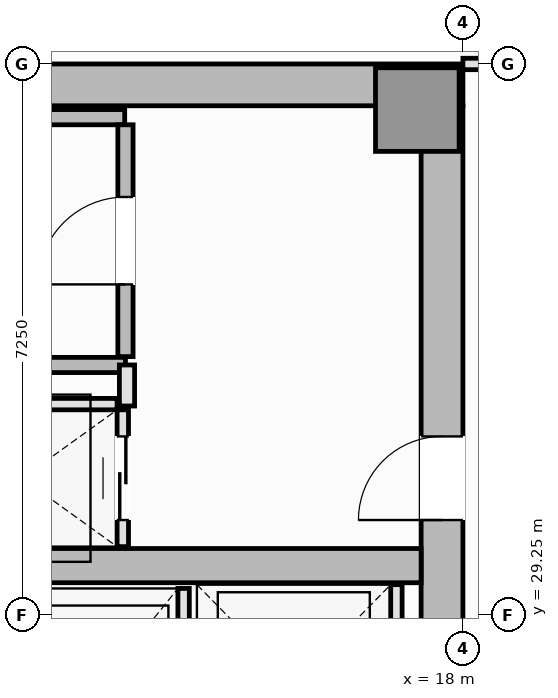
"""IFC4 building model, lengths in metres.
Left out: names, types, materials, properties, quantities, classifications, styles, units other than length and angle.
Written with IfcOpenShell. Run it as: python <this file> out.ifc"""

import sys

from ifc_helpers import new_model, si_unit, direction, frame, frame_2d, origin, origin_2d, place, context, subcontext, project, spatial, rectangle, extrude, element, fill, save


model = new_model("IFC4")
c1 = context("Model", 3, precision=1e-05, world=origin(), true_north=direction((0.0, 1.0)))
c2 = subcontext(c1, "Body", "Model", "MODEL_VIEW")
j1 = project(units=[si_unit("LENGTHUNIT", "METRE"), si_unit("PLANEANGLEUNIT", "RADIAN")], contexts=[c1])
p1 = place(None, origin())
s1 = spatial("IfcSite", under=j1, at=p1, CompositionType="ELEMENT")
p2 = place(p1, origin())
s2 = spatial("IfcBuilding", under=s1, at=p2, CompositionType="ELEMENT")
p3 = place(p2, frame((0.0, 0.0, 183.65)))
s3 = spatial("IfcBuildingStorey", under=s2, at=p3, CompositionType="ELEMENT", Elevation=183.65)
p4 = place(p3, frame((4.5, 36.225, 0.0), z_axis=(0.0, 0.0, 1.0), x_axis=(1.0, 0.0, 0.0)))
e1 = element("IfcWall", 1, at=p4, inside=s3, PredefinedType="SHEAR", context=c2, shape_type="SweptSolid", body=[
    extrude(rectangle(XDim=13.5, YDim=0.55, at=frame_2d((6.75, 0.0))), origin(), (0.0, 0.0, 1.0), 4.4),
])
p5 = place(p3, frame((17.725, 27.05, 0.0), z_axis=(0.0, 0.0, 1.0), x_axis=(0.0, 1.0, 0.0)))
e2 = element("IfcWall", 2, at=p5, inside=s3, PredefinedType="SHEAR", context=c2, shape_type="SweptSolid", body=[
    extrude(rectangle(XDim=8.9, YDim=0.55, at=frame_2d((4.45, 0.0))), origin(), (0.0, 0.0, 1.0), 4.4),
])
p6 = place(p5, frame((3.45, 0.0, 0.0)))
e3 = element("IfcOpeningElement", 3, at=p6, cuts=e2, PredefinedType="OPENING", context=c2, shape_type="SweptSolid", body=[
    extrude(rectangle(XDim=1.1, YDim=2.15, at=frame_2d((0.55, 1.075))), frame((0.0, 0.285, 0.0), z_axis=(0.0, -1.0, 0.0), x_axis=(1.0, 0.0, 0.0)), (0.0, 0.0, 1.0), 0.57),
])
p7 = place(p3, frame((5.05, 29.9, 0.0), z_axis=(0.0, 0.0, 1.0), x_axis=(1.0, 0.0, 0.0)))
e4 = element("IfcWall", 4, at=p7, inside=s3, PredefinedType="SHEAR", context=c2, shape_type="SweptSolid", body=[
    extrude(rectangle(XDim=12.4, YDim=0.45, at=frame_2d((6.2, 0.0))), origin(), (0.0, 0.0, 1.0), 4.4),
])
p8 = place(p3, frame((17.4, 35.9, 0.0), z_axis=(0.0, 0.0, 1.0), x_axis=(1.0, 0.0, 0.0)))
e5 = element("IfcColumn", 5, at=p8, inside=s3, PredefinedType="PILASTER", context=c2, shape_type="SweptSolid", body=[
    extrude(rectangle(XDim=1.1, YDim=1.1, at=origin_2d()), origin(), (0.0, 0.0, 1.0), 4.4),
])
p9 = place(p3, frame((5.8, 35.8, 0.0), z_axis=(0.0, 0.0, 1.0), x_axis=(1.0, 0.0, 0.0)))
e6 = element("IfcWall", 6, at=p9, inside=s3, PredefinedType="SOLIDWALL", context=c2, shape_type="SweptSolid", body=[
    extrude(rectangle(XDim=7.75, YDim=0.2, at=frame_2d((3.875, 0.0))), origin(), (0.0, 0.0, 1.0), 4.4),
])
p10 = place(p3, frame((5.9, 32.54, 0.0), z_axis=(0.0, 0.0, 1.0), x_axis=(1.0, 0.0, 0.0)))
e7 = element("IfcWall", 7, at=p10, inside=s3, PredefinedType="SOLIDWALL", context=c2, shape_type="SweptSolid", body=[
    extrude(rectangle(XDim=7.66, YDim=0.2, at=frame_2d((3.83, 0.0))), origin(), (0.0, 0.0, 1.0), 4.4),
])
p11 = place(p3, frame((13.56, 32.65, 0.0), z_axis=(0.0, 0.0, 1.0), x_axis=(0.0, 1.0, 0.0)))
e8 = element("IfcWall", 8, at=p11, inside=s3, PredefinedType="SOLIDWALL", context=c2, shape_type="SweptSolid", body=[
    extrude(rectangle(XDim=3.05, YDim=0.2, at=frame_2d((1.525, 0.0))), origin(), (0.0, 0.0, 1.0), 4.4),
])
p12 = place(p11, frame((0.95, 0.0, 0.0)))
e9 = element("IfcOpeningElement", 9, at=p12, cuts=e8, PredefinedType="OPENING", context=c2, shape_type="SweptSolid", body=[
    extrude(rectangle(XDim=1.15, YDim=2.15, at=frame_2d((0.575, 1.075))), frame((0.0, 0.11, 0.0), z_axis=(0.0, -1.0, 0.0), x_axis=(1.0, 0.0, 0.0)), (0.0, 0.0, 1.0), 0.22),
])
p13 = place(p3, frame((14.325, 27.05, 0.0), z_axis=(0.0, 0.0, 1.0), x_axis=(0.0, 1.0, 0.0)))
e10 = element("IfcWall", 10, at=p13, inside=s3, PredefinedType="PARTITIONING", context=c2, shape_type="SweptSolid", body=[
    extrude(rectangle(XDim=2.55, YDim=0.15, at=frame_2d((1.275, 0.0))), origin(), (0.0, 0.0, 1.0), 4.22),
])
p14 = place(p3, frame((17.125, 27.05, 0.0), z_axis=(0.0, 0.0, 1.0), x_axis=(0.0, 1.0, 0.0)))
e11 = element("IfcWall", 11, at=p14, inside=s3, PredefinedType="PARTITIONING", context=c2, shape_type="SweptSolid", body=[
    extrude(rectangle(XDim=2.6, YDim=0.15, at=frame_2d((1.3, 0.0))), origin(), (0.0, 0.0, 1.0), 4.22),
])
p15 = place(p3, frame((10.95, 32.025, 0.0), z_axis=(0.0, 0.0, 1.0), x_axis=(1.0, 0.0, 0.0)))
e12 = element("IfcWall", 12, at=p15, inside=s3, PredefinedType="PARTITIONING", context=c2, shape_type="SweptSolid", body=[
    extrude(rectangle(XDim=2.5, YDim=0.15, at=frame_2d((1.25, 0.0))), origin(), (0.0, 0.0, 1.0), 4.22),
])
p16 = place(p3, frame((13.525, 30.15, 0.0), z_axis=(0.0, 0.0, 1.0), x_axis=(0.0, 1.0, 0.0)))
e13 = element("IfcWall", 13, at=p16, inside=s3, PredefinedType="PARTITIONING", context=c2, shape_type="SweptSolid", body=[
    extrude(rectangle(XDim=1.8, YDim=0.15, at=frame_2d((0.9, 0.0))), origin(), (0.0, 0.0, 1.0), 4.22),
])
p17 = place(p16, frame((0.35, 0.0, 0.0)))
e14 = element("IfcOpeningElement", 14, at=p17, cuts=e13, PredefinedType="OPENING", context=c2, shape_type="SweptSolid", body=[
    extrude(rectangle(XDim=1.1, YDim=2.2, at=frame_2d((0.55, 1.1))), frame((0.0, 0.085, 0.0), z_axis=(0.0, -1.0, 0.0), x_axis=(1.0, 0.0, 0.0)), (0.0, 0.0, 1.0), 0.17),
])
p18 = place(p3, frame((13.58, 32.0, 0.0), z_axis=(0.0, 0.0, 1.0), x_axis=(0.0, 1.0, 0.0)))
e15 = element("IfcWall", 15, at=p18, inside=s3, PredefinedType="PARTITIONING", context=c2, shape_type="SweptSolid", body=[
    extrude(rectangle(XDim=0.54, YDim=0.2, at=frame_2d((0.27, 0.0))), origin(), (0.0, 0.0, 1.0), 4.22),
])
p19 = place(p3, frame((18.0, 36.5, 0.0), z_axis=(0.0, 0.0, 1.0), x_axis=(1.0, 0.0, 0.0)))
e16 = element("IfcWall", 16, at=p19, inside=s3, PredefinedType="PARTITIONING", context=c2, shape_type="SweptSolid", body=[
    extrude(rectangle(XDim=2.2, YDim=0.15, at=frame_2d((1.1, 0.0))), origin(), (0.0, 0.0, 1.0), 4.22),
])
p20 = place(p19, frame((0.65, 0.0, 0.0)))
e17 = element("IfcOpeningElement", 17, at=p20, cuts=e16, PredefinedType="OPENING", context=c2, shape_type="SweptSolid", body=[
    extrude(rectangle(XDim=0.9, YDim=2.1, at=frame_2d((0.45, 1.05))), frame((0.0, 0.085, 0.0), z_axis=(0.0, -1.0, 0.0), x_axis=(1.0, 0.0, 0.0)), (0.0, 0.0, 1.0), 0.17),
])
p21 = place(p12, origin())
e18 = element("IfcDoor", 18, at=p21, inside=s3, OperationType="SINGLE_SWING_LEFT", PredefinedType="DOOR", context=c2, shape_type="SweptSolid", body=[
    extrude(rectangle(XDim=1.15, YDim=2.15, at=frame_2d((0.575, 1.075))), frame((0.0, 0.025, 0.0), z_axis=(0.0, -1.0, 0.0), x_axis=(1.0, 0.0, 0.0)), (0.0, 0.0, 1.0), 0.05),
])
fill(e9, e18)
p22 = place(p17, origin())
e19 = element("IfcDoor", 19, at=p22, inside=s3, OperationType="DOUBLE_DOOR_SLIDING", PredefinedType="DOOR", context=c2, shape_type="SweptSolid", body=[
    extrude(rectangle(XDim=1.1, YDim=2.2, at=frame_2d((0.55, 1.1))), frame((0.0, 0.025, 0.0), z_axis=(0.0, -1.0, 0.0), x_axis=(1.0, 0.0, 0.0)), (0.0, 0.0, 1.0), 0.05),
])
fill(e14, e19)
p23 = place(p6, origin())
e20 = element("IfcDoor", 20, at=p23, inside=s3, OperationType="SINGLE_SWING_LEFT", PredefinedType="DOOR", context=c2, shape_type="SweptSolid", body=[
    extrude(rectangle(XDim=1.1, YDim=2.15, at=frame_2d((0.55, 1.075))), frame((0.0, 0.025, 0.0), z_axis=(0.0, -1.0, 0.0), x_axis=(1.0, 0.0, 0.0)), (0.0, 0.0, 1.0), 0.05),
])
fill(e3, e20)
save(model, sys.argv[1])
